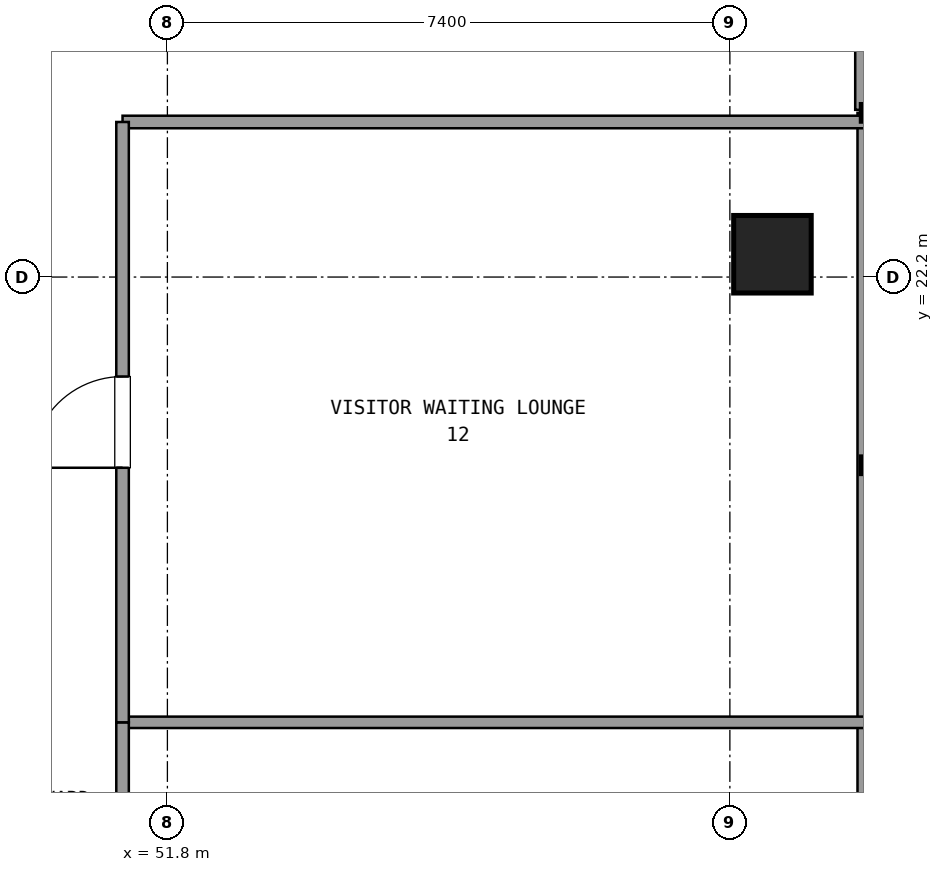
"""IFC4 building model, lengths in metres.
Left out: names, types, materials, properties, quantities, classifications, styles, units other than length and angle.
Written with IfcOpenShell. Run it as: python <this file> out.ifc"""

import sys

from ifc_helpers import new_model, si_unit, direction, frame, frame_2d, origin, origin_2d, place, context, subcontext, project, spatial, rectangle, extrude, element, fill, save


model = new_model("IFC4")
c1 = context("Model", 3, precision=1e-05, world=origin(), true_north=direction((0.0, 1.0)))
c2 = subcontext(c1, "Body", "Model", "MODEL_VIEW")
j1 = project(units=[si_unit("LENGTHUNIT", "METRE"), si_unit("PLANEANGLEUNIT", "RADIAN")], contexts=[c1])
p1 = place(None, origin())
s1 = spatial("IfcSite", under=j1, at=p1, CompositionType="ELEMENT")
p2 = place(p1, origin())
s2 = spatial("IfcBuilding", under=s1, at=p2, CompositionType="ELEMENT")
p3 = place(p2, frame((0.0, 0.0, 120.78)))
s3 = spatial("IfcBuildingStorey", under=s2, at=p3, CompositionType="ELEMENT", Elevation=120.78)
p4 = place(p3, frame((59.76, 22.5, 0.021), z_axis=(-0.084850379912, 0.0, 0.996393703828), x_axis=(0.0, -1.0, 0.0)))
e1 = element("IfcColumn", 1, at=p4, inside=s3, PredefinedType="COLUMN", context=c2, shape_type="SweptSolid", body=[
    extrude(rectangle(XDim=1.02, YDim=1.02, at=origin_2d()), origin(), (0.0, 0.0, 1.0), 3.571),
])
p5 = place(p3, frame((60.999, 24.4, 0.0), z_axis=(0.0, 0.0, 1.0), x_axis=(0.0, 1.0, 0.0)))
e2 = element("IfcWall", 2, at=p5, inside=s3, PredefinedType="SOLIDWALL", context=c2, shape_type="SweptSolid", body=[
    extrude(rectangle(XDim=3.0, YDim=0.3, at=frame_2d((1.5, 0.0))), origin(), (0.0, 0.0, 1.0), 2.65),
])
p6 = place(p5, frame((0.9, 0.0, 0.0)))
e3 = element("IfcOpeningElement", 3, at=p6, cuts=e2, PredefinedType="OPENING", context=c2, shape_type="SweptSolid", body=[
    extrude(rectangle(XDim=1.2, YDim=2.2, at=frame_2d((0.6, 1.1))), frame((0.0, 0.16, 0.0), z_axis=(0.0, -1.0, 0.0), x_axis=(1.0, 0.0, 0.0)), (0.0, 0.0, 1.0), 0.32),
])
p7 = place(p3, frame((60.999, 10.452, 0.0), z_axis=(0.0, 0.0, 1.0), x_axis=(0.0, 1.0, 0.0)))
e4 = element("IfcWall", 4, at=p7, inside=s3, PredefinedType="SOLIDWALL", context=c2, shape_type="SweptSolid", body=[
    extrude(rectangle(XDim=13.908, YDim=0.24, at=frame_2d((6.954, 0.0))), origin(), (0.0, 0.0, 1.0), 0.85),
])
p8 = place(p3, frame((51.21, 24.24, 0.0), z_axis=(0.0, 0.0, 1.0), x_axis=(1.0, 0.0, 0.0)))
e5 = element("IfcWall", 5, at=p8, inside=s3, PredefinedType="PARTITIONING", context=c2, shape_type="SweptSolid", body=[
    extrude(rectangle(XDim=9.77, YDim=0.165, at=frame_2d((4.885, 0.0))), origin(), (0.0, 0.0, 1.0), 2.59),
])
p9 = place(p3, frame((51.21, 16.342, 0.0), z_axis=(0.0, 0.0, 1.0), x_axis=(1.0, 0.0, 0.0)))
e6 = element("IfcWall", 6, at=p9, inside=s3, PredefinedType="PARTITIONING", context=c2, shape_type="SweptSolid", body=[
    extrude(rectangle(XDim=9.77, YDim=0.15, at=frame_2d((4.885, 0.0))), origin(), (0.0, 0.0, 1.0), 2.59),
])
p10 = place(p3, frame((51.21, 4.496, 0.0), z_axis=(0.0, 0.0, 1.0), x_axis=(0.0, 1.0, 0.0)))
e7 = element("IfcWall", 7, at=p10, inside=s3, PredefinedType="PARTITIONING", context=c2, shape_type="SweptSolid", body=[
    extrude(rectangle(XDim=11.846, YDim=0.165, at=frame_2d((5.923, 0.0))), origin(), (0.0, 0.0, 1.0), 2.59),
])
p11 = place(p10, frame((5.323, 0.0, 0.0)))
e8 = element("IfcOpeningElement", 8, at=p11, cuts=e7, PredefinedType="OPENING", context=c2, shape_type="SweptSolid", body=[
    extrude(rectangle(XDim=1.2, YDim=2.15, at=frame_2d((0.6, 1.075))), frame((0.0, 0.093, 0.0), z_axis=(0.0, -1.0, 0.0), x_axis=(1.0, 0.0, 0.0)), (0.0, 0.0, 1.0), 0.185),
])
p12 = place(p3, frame((51.21, 16.342, 0.0), z_axis=(0.0, 0.0, 1.0), x_axis=(0.0, 1.0, 0.0)))
e9 = element("IfcWall", 9, at=p12, inside=s3, PredefinedType="PARTITIONING", context=c2, shape_type="SweptSolid", body=[
    extrude(rectangle(XDim=7.898, YDim=0.165, at=frame_2d((3.949, 0.0))), origin(), (0.0, 0.0, 1.0), 2.59),
])
p13 = place(p12, frame((3.349, 0.0, 0.0)))
e10 = element("IfcOpeningElement", 10, at=p13, cuts=e9, PredefinedType="OPENING", context=c2, shape_type="SweptSolid", body=[
    extrude(rectangle(XDim=1.2, YDim=2.15, at=frame_2d((0.6, 1.075))), frame((0.0, 0.093, 0.0), z_axis=(0.0, -1.0, 0.0), x_axis=(1.0, 0.0, 0.0)), (0.0, 0.0, 1.0), 0.185),
])
p14 = place(p13, origin())
e11 = element("IfcDoor", 11, at=p14, inside=s3, OperationType="SINGLE_SWING_LEFT", PredefinedType="DOOR", context=c2, shape_type="SweptSolid", body=[
    extrude(rectangle(XDim=1.2, YDim=2.15, at=frame_2d((0.6, 1.075))), frame((0.0, 0.025, 0.0), z_axis=(0.0, -1.0, 0.0), x_axis=(1.0, 0.0, 0.0)), (0.0, 0.0, 1.0), 0.05),
])
fill(e10, e11)
save(model, sys.argv[1])
